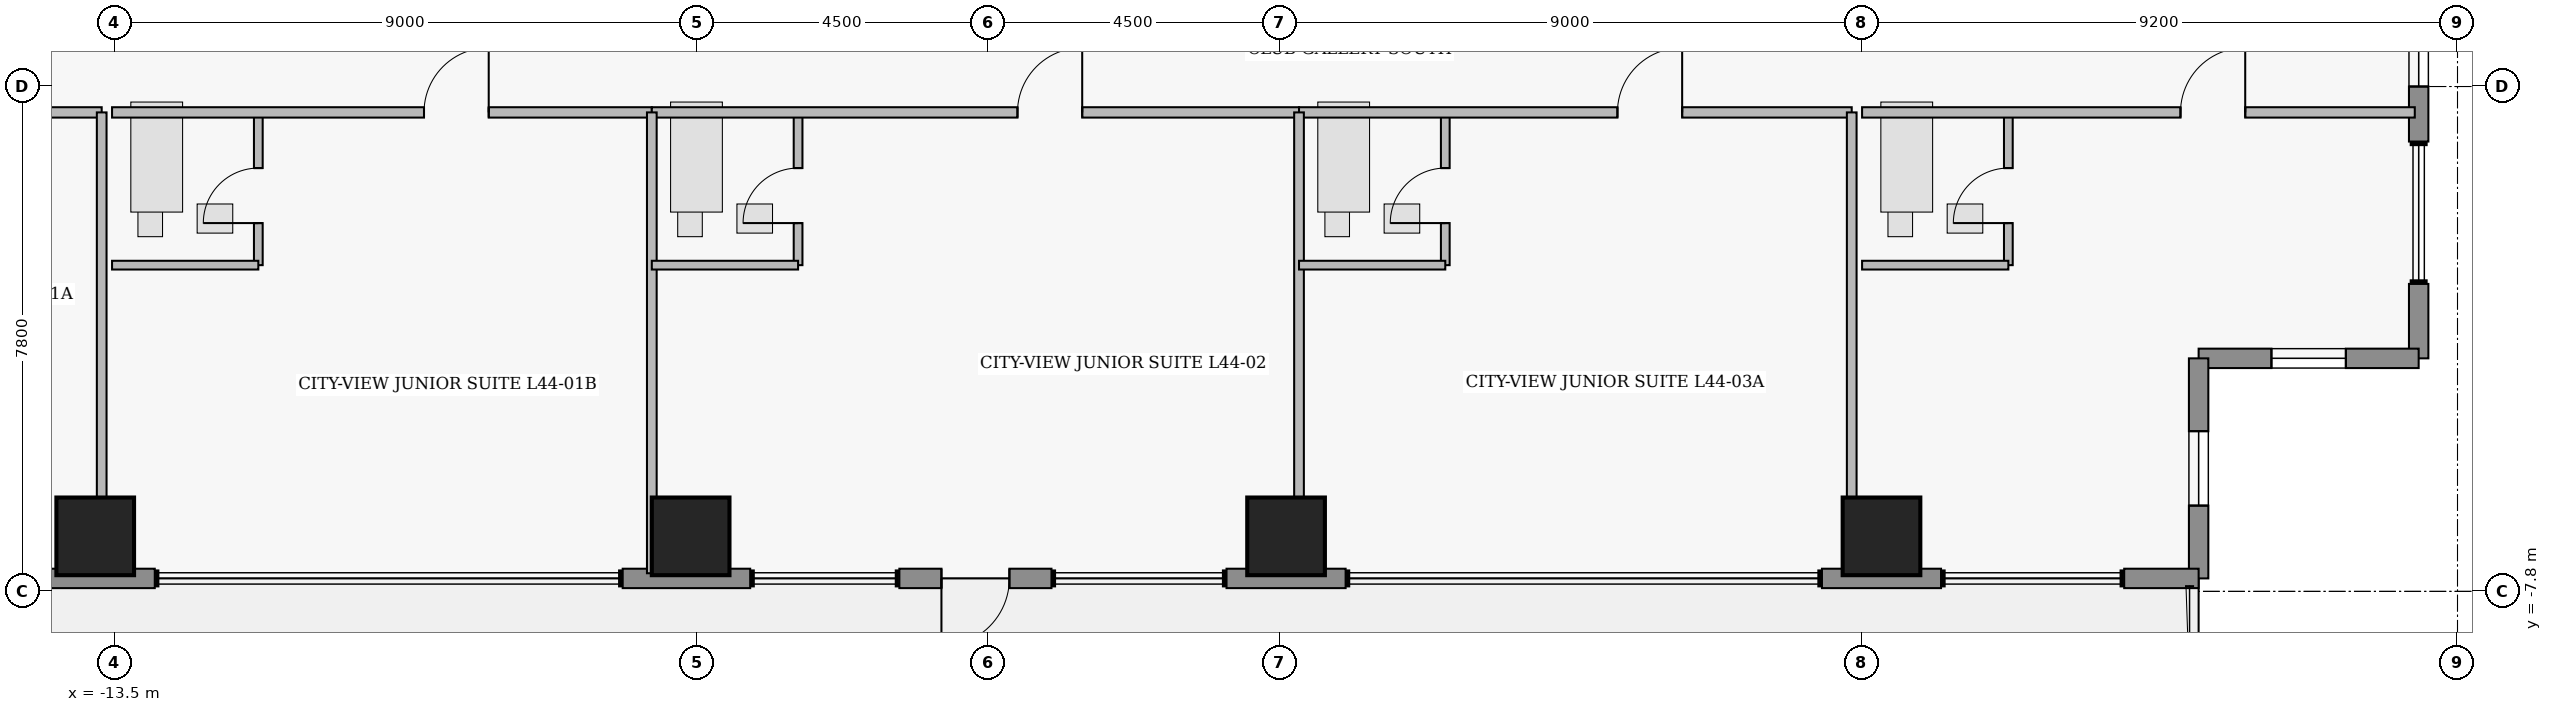
"""IFC4 building model, lengths in metres.
Left out: names, types, materials, properties, quantities, classifications, styles, units other than length and angle.
Written with IfcOpenShell. Run it as: python <this file> out.ifc"""

import sys

from ifc_helpers import new_model, si_unit, direction, frame, frame_2d, origin, origin_2d, place, context, subcontext, project, spatial, rectangle, extrude, element, fill, save


model = new_model("IFC4")
c1 = context("Model", 3, precision=1e-05, world=origin(), true_north=direction((0.0, 1.0)))
c2 = subcontext(c1, "Body", "Model", "MODEL_VIEW")
j1 = project(units=[si_unit("LENGTHUNIT", "METRE"), si_unit("PLANEANGLEUNIT", "RADIAN")], contexts=[c1])
p1 = place(None, origin())
s1 = spatial("IfcSite", under=j1, at=p1, CompositionType="ELEMENT")
p2 = place(p1, origin())
s2 = spatial("IfcBuilding", under=s1, at=p2, CompositionType="ELEMENT")
p3 = place(p2, frame((0.0, 0.0, 177.4)))
s3 = spatial("IfcBuildingStorey", under=s2, at=p3, CompositionType="ELEMENT", Elevation=177.4)
for number, where, z_axis, x_axis in (
    (1, (-13.8, -6.95, 0.0), (0.0, 0.0, 1.0), (1.0, 0.0, 0.0)),
    (2, (-4.6, -6.95, 0.0), (0.0, 0.0, 1.0), (1.0, 0.0, 0.0)),
    (3, (4.6, -6.95, 0.0), (0.0, 0.0, 1.0), (1.0, 0.0, 0.0)),
    (4, (13.8, -6.95, 0.0), (0.0, 0.0, 1.0), (1.0, 0.0, 0.0)),
):
    element("IfcColumn", number, at=place(p3, frame(where, z_axis=z_axis, x_axis=x_axis)), inside=s3, PredefinedType="COLUMN", context=c2, shape_type="SweptSolid", body=[
        extrude(rectangle(XDim=1.2, YDim=1.2, at=origin_2d()), origin(), (0.0, 0.0, 1.0), 3.75),
    ])
p4 = place(p3, frame((22.1, 2.0, 0.0), z_axis=(0.0, 0.0, 1.0), x_axis=(0.0, -1.0, 0.0)))
e5 = element("IfcWall", 5, at=p4, inside=s3, PredefinedType="STANDARD", context=c2, shape_type="SweptSolid", body=[
    extrude(rectangle(XDim=2.85, YDim=0.3, at=frame_2d((1.425, 0.0))), origin(), (0.0, 0.0, 1.0), 3.53),
])
p5 = place(p4, frame((0.85, 0.0, 0.95)))
e6 = element("IfcOpeningElement", 6, at=p5, cuts=e5, PredefinedType="OPENING", context=c2, shape_type="SweptSolid", body=[
    extrude(rectangle(XDim=1.15, YDim=1.55, at=frame_2d((0.575, 0.775))), frame((0.0, 0.16, 0.0), z_axis=(0.0, -1.0, 0.0), x_axis=(1.0, 0.0, 0.0)), (0.0, 0.0, 1.0), 0.32),
])
p6 = place(p3, frame((22.1, -3.05, 0.0), z_axis=(0.0, 0.0, 1.0), x_axis=(0.0, -1.0, 0.0)))
e7 = element("IfcWall", 7, at=p6, inside=s3, PredefinedType="STANDARD", context=c2, shape_type="SweptSolid", body=[
    extrude(rectangle(XDim=1.15, YDim=0.3, at=frame_2d((0.575, 0.0))), origin(), (0.0, 0.0, 1.0), 3.53),
])
p7 = place(p3, frame((22.1, -4.2, 0.0), z_axis=(0.0, 0.0, 1.0), x_axis=(-1.0, 0.0, 0.0)))
e8 = element("IfcWall", 8, at=p7, inside=s3, PredefinedType="STANDARD", context=c2, shape_type="SweptSolid", body=[
    extrude(rectangle(XDim=3.4, YDim=0.3, at=frame_2d((1.7, 0.0))), origin(), (0.0, 0.0, 1.0), 3.53),
])
p8 = place(p7, frame((1.125, 0.0, 1.25)))
e9 = element("IfcOpeningElement", 9, at=p8, cuts=e8, PredefinedType="OPENING", context=c2, shape_type="SweptSolid", body=[
    extrude(rectangle(XDim=1.15, YDim=1.55, at=frame_2d((0.575, 0.775))), frame((0.0, 0.16, 0.0), z_axis=(0.0, -1.0, 0.0), x_axis=(1.0, 0.0, 0.0)), (0.0, 0.0, 1.0), 0.32),
])
p9 = place(p3, frame((18.7, -4.2, 0.0), z_axis=(0.0, 0.0, 1.0), x_axis=(0.0, -1.0, 0.0)))
e10 = element("IfcWall", 10, at=p9, inside=s3, PredefinedType="STANDARD", context=c2, shape_type="SweptSolid", body=[
    extrude(rectangle(XDim=3.4, YDim=0.3, at=frame_2d((1.7, 0.0))), origin(), (0.0, 0.0, 1.0), 3.53),
])
p10 = place(p9, frame((1.125, 0.0, 1.25)))
e11 = element("IfcOpeningElement", 11, at=p10, cuts=e10, PredefinedType="OPENING", context=c2, shape_type="SweptSolid", body=[
    extrude(rectangle(XDim=1.15, YDim=1.55, at=frame_2d((0.575, 0.775))), frame((0.0, 0.16, 0.0), z_axis=(0.0, -1.0, 0.0), x_axis=(1.0, 0.0, 0.0)), (0.0, 0.0, 1.0), 0.32),
])
p11 = place(p3, frame((18.7, -7.6, 0.0), z_axis=(0.0, 0.0, 1.0), x_axis=(-1.0, 0.0, 0.0)))
e12 = element("IfcWall", 12, at=p11, inside=s3, PredefinedType="STANDARD", context=c2, shape_type="SweptSolid", body=[
    extrude(rectangle(XDim=1.15, YDim=0.3, at=frame_2d((0.575, 0.0))), origin(), (0.0, 0.0, 1.0), 3.53),
])
for number, where, z_axis, x_axis in (
    (13, (14.72, -7.6, 0.0), (0.0, 0.0, 1.0), (-1.0, 0.0, 0.0)),
    (14, (5.52, -7.6, 0.0), (0.0, 0.0, 1.0), (-1.0, 0.0, 0.0)),
):
    element("IfcWall", number, at=place(p3, frame(where, z_axis=z_axis, x_axis=x_axis)), inside=s3, PredefinedType="STANDARD", context=c2, shape_type="SweptSolid", body=[
        extrude(rectangle(XDim=1.84, YDim=0.3, at=frame_2d((0.92, 0.0))), origin(), (0.0, 0.0, 1.0), 3.53),
    ])
p12 = place(p3, frame((0.975, -7.6, 0.0), z_axis=(0.0, 0.0, 1.0), x_axis=(-1.0, 0.0, 0.0)))
e15 = element("IfcWall", 15, at=p12, inside=s3, PredefinedType="STANDARD", context=c2, shape_type="SweptSolid", body=[
    extrude(rectangle(XDim=2.35, YDim=0.3, at=frame_2d((1.175, 0.0))), origin(), (0.0, 0.0, 1.0), 3.53),
])
p13 = place(p12, frame((0.65, 0.0, 0.0)))
e16 = element("IfcOpeningElement", 16, at=p13, cuts=e15, PredefinedType="OPENING", context=c2, shape_type="SweptSolid", body=[
    extrude(rectangle(XDim=1.05, YDim=2.2, at=frame_2d((0.525, 1.1))), frame((0.0, 0.16, 0.0), z_axis=(0.0, -1.0, 0.0), x_axis=(1.0, 0.0, 0.0)), (0.0, 0.0, 1.0), 0.32),
])
p14 = place(p3, frame((-3.68, -7.6, 0.0), z_axis=(0.0, 0.0, 1.0), x_axis=(-1.0, 0.0, 0.0)))
e17 = element("IfcWall", 17, at=p14, inside=s3, PredefinedType="STANDARD", context=c2, shape_type="SweptSolid", body=[
    extrude(rectangle(XDim=1.97, YDim=0.3, at=frame_2d((0.985, 0.0))), origin(), (0.0, 0.0, 1.0), 3.53),
])
p15 = place(p3, frame((-12.88, -7.6, 0.0), z_axis=(0.0, 0.0, 1.0), x_axis=(-1.0, 0.0, 0.0)))
e18 = element("IfcWall", 18, at=p15, inside=s3, PredefinedType="STANDARD", context=c2, shape_type="SweptSolid", body=[
    extrude(rectangle(XDim=1.84, YDim=0.3, at=frame_2d((0.92, 0.0))), origin(), (0.0, 0.0, 1.0), 3.53),
])
p16 = place(p3, frame((-22.04, -0.4, 0.0), z_axis=(0.0, 0.0, 1.0), x_axis=(1.0, 0.0, 0.0)))
e19 = element("IfcWall", 19, at=p16, inside=s3, PredefinedType="PARTITIONING", context=c2, shape_type="SweptSolid", body=[
    extrude(rectangle(XDim=8.34, YDim=0.16, at=frame_2d((4.17, 0.0))), origin(), (0.0, 0.0, 1.0), 3.53),
])
p17 = place(p16, frame((4.82, 0.0, 0.0)))
e20 = element("IfcOpeningElement", 20, at=p17, cuts=e19, PredefinedType="OPENING", context=c2, shape_type="SweptSolid", body=[
    extrude(rectangle(XDim=1.0, YDim=2.15, at=frame_2d((0.5, 1.075))), frame((0.0, 0.09, 0.0), z_axis=(0.0, -1.0, 0.0), x_axis=(1.0, 0.0, 0.0)), (0.0, 0.0, 1.0), 0.18),
])
p18 = place(p3, frame((-11.28, -2.76, 0.0), z_axis=(0.0, 0.0, 1.0), x_axis=(0.0, 1.0, 0.0)))
e21 = element("IfcWall", 21, at=p18, inside=s3, PredefinedType="PLUMBINGWALL", context=c2, shape_type="SweptSolid", body=[
    extrude(rectangle(XDim=2.36, YDim=0.135, at=frame_2d((1.18, 0.0))), origin(), (0.0, 0.0, 1.0), 3.53),
])
p19 = place(p18, frame((0.65, 0.0, 0.0)))
e22 = element("IfcOpeningElement", 22, at=p19, cuts=e21, PredefinedType="OPENING", context=c2, shape_type="SweptSolid", body=[
    extrude(rectangle(XDim=0.85, YDim=2.1, at=frame_2d((0.425, 1.05))), frame((0.0, 0.077, 0.0), z_axis=(0.0, -1.0, 0.0), x_axis=(1.0, 0.0, 0.0)), (0.0, 0.0, 1.0), 0.155),
])
p20 = place(p3, frame((-13.54, -0.4, 0.0), z_axis=(0.0, 0.0, 1.0), x_axis=(1.0, 0.0, 0.0)))
e23 = element("IfcWall", 23, at=p20, inside=s3, PredefinedType="PARTITIONING", context=c2, shape_type="SweptSolid", body=[
    extrude(rectangle(XDim=8.34, YDim=0.16, at=frame_2d((4.17, 0.0))), origin(), (0.0, 0.0, 1.0), 3.53),
])
p21 = place(p20, frame((4.82, 0.0, 0.0)))
e24 = element("IfcOpeningElement", 24, at=p21, cuts=e23, PredefinedType="OPENING", context=c2, shape_type="SweptSolid", body=[
    extrude(rectangle(XDim=1.0, YDim=2.15, at=frame_2d((0.5, 1.075))), frame((0.0, 0.09, 0.0), z_axis=(0.0, -1.0, 0.0), x_axis=(1.0, 0.0, 0.0)), (0.0, 0.0, 1.0), 0.18),
])
p22 = place(p3, frame((-2.94, -2.76, 0.0), z_axis=(0.0, 0.0, 1.0), x_axis=(0.0, 1.0, 0.0)))
e25 = element("IfcWall", 25, at=p22, inside=s3, PredefinedType="PLUMBINGWALL", context=c2, shape_type="SweptSolid", body=[
    extrude(rectangle(XDim=2.36, YDim=0.135, at=frame_2d((1.18, 0.0))), origin(), (0.0, 0.0, 1.0), 3.53),
])
p23 = place(p22, frame((0.65, 0.0, 0.0)))
e26 = element("IfcOpeningElement", 26, at=p23, cuts=e25, PredefinedType="OPENING", context=c2, shape_type="SweptSolid", body=[
    extrude(rectangle(XDim=0.85, YDim=2.1, at=frame_2d((0.425, 1.05))), frame((0.0, 0.077, 0.0), z_axis=(0.0, -1.0, 0.0), x_axis=(1.0, 0.0, 0.0)), (0.0, 0.0, 1.0), 0.155),
])
p24 = place(p3, frame((-5.2, -0.4, 0.0), z_axis=(0.0, 0.0, 1.0), x_axis=(1.0, 0.0, 0.0)))
e27 = element("IfcWall", 27, at=p24, inside=s3, PredefinedType="PARTITIONING", context=c2, shape_type="SweptSolid", body=[
    extrude(rectangle(XDim=10.0, YDim=0.16, at=frame_2d((5.0, 0.0))), origin(), (0.0, 0.0, 1.0), 3.53),
])
p25 = place(p24, frame((5.65, 0.0, 0.0)))
e28 = element("IfcOpeningElement", 28, at=p25, cuts=e27, PredefinedType="OPENING", context=c2, shape_type="SweptSolid", body=[
    extrude(rectangle(XDim=1.0, YDim=2.15, at=frame_2d((0.5, 1.075))), frame((0.0, 0.09, 0.0), z_axis=(0.0, -1.0, 0.0), x_axis=(1.0, 0.0, 0.0)), (0.0, 0.0, 1.0), 0.18),
])
p26 = place(p3, frame((7.06, -2.76, 0.0), z_axis=(0.0, 0.0, 1.0), x_axis=(0.0, 1.0, 0.0)))
e29 = element("IfcWall", 29, at=p26, inside=s3, PredefinedType="PLUMBINGWALL", context=c2, shape_type="SweptSolid", body=[
    extrude(rectangle(XDim=2.36, YDim=0.135, at=frame_2d((1.18, 0.0))), origin(), (0.0, 0.0, 1.0), 3.53),
])
p27 = place(p26, frame((0.65, 0.0, 0.0)))
e30 = element("IfcOpeningElement", 30, at=p27, cuts=e29, PredefinedType="OPENING", context=c2, shape_type="SweptSolid", body=[
    extrude(rectangle(XDim=0.85, YDim=2.1, at=frame_2d((0.425, 1.05))), frame((0.0, 0.077, 0.0), z_axis=(0.0, -1.0, 0.0), x_axis=(1.0, 0.0, 0.0)), (0.0, 0.0, 1.0), 0.155),
])
p28 = place(p3, frame((4.8, -0.4, 0.0), z_axis=(0.0, 0.0, 1.0), x_axis=(1.0, 0.0, 0.0)))
e31 = element("IfcWall", 31, at=p28, inside=s3, PredefinedType="PARTITIONING", context=c2, shape_type="SweptSolid", body=[
    extrude(rectangle(XDim=8.54, YDim=0.16, at=frame_2d((4.27, 0.0))), origin(), (0.0, 0.0, 1.0), 3.53),
])
p29 = place(p28, frame((4.92, 0.0, 0.0)))
e32 = element("IfcOpeningElement", 32, at=p29, cuts=e31, PredefinedType="OPENING", context=c2, shape_type="SweptSolid", body=[
    extrude(rectangle(XDim=1.0, YDim=2.15, at=frame_2d((0.5, 1.075))), frame((0.0, 0.09, 0.0), z_axis=(0.0, -1.0, 0.0), x_axis=(1.0, 0.0, 0.0)), (0.0, 0.0, 1.0), 0.18),
])
p30 = place(p3, frame((15.76, -2.76, 0.0), z_axis=(0.0, 0.0, 1.0), x_axis=(0.0, 1.0, 0.0)))
e33 = element("IfcWall", 33, at=p30, inside=s3, PredefinedType="PLUMBINGWALL", context=c2, shape_type="SweptSolid", body=[
    extrude(rectangle(XDim=2.36, YDim=0.135, at=frame_2d((1.18, 0.0))), origin(), (0.0, 0.0, 1.0), 3.53),
])
p31 = place(p30, frame((0.65, 0.0, 0.0)))
e34 = element("IfcOpeningElement", 34, at=p31, cuts=e33, PredefinedType="OPENING", context=c2, shape_type="SweptSolid", body=[
    extrude(rectangle(XDim=0.85, YDim=2.1, at=frame_2d((0.425, 1.05))), frame((0.0, 0.077, 0.0), z_axis=(0.0, -1.0, 0.0), x_axis=(1.0, 0.0, 0.0)), (0.0, 0.0, 1.0), 0.155),
])
p32 = place(p3, frame((13.5, -0.4, 0.0), z_axis=(0.0, 0.0, 1.0), x_axis=(1.0, 0.0, 0.0)))
e35 = element("IfcWall", 35, at=p32, inside=s3, PredefinedType="PARTITIONING", context=c2, shape_type="SweptSolid", body=[
    extrude(rectangle(XDim=8.54, YDim=0.16, at=frame_2d((4.27, 0.0))), origin(), (0.0, 0.0, 1.0), 3.53),
])
p33 = place(p32, frame((4.92, 0.0, 0.0)))
e36 = element("IfcOpeningElement", 36, at=p33, cuts=e35, PredefinedType="OPENING", context=c2, shape_type="SweptSolid", body=[
    extrude(rectangle(XDim=1.0, YDim=2.15, at=frame_2d((0.5, 1.075))), frame((0.0, 0.09, 0.0), z_axis=(0.0, -1.0, 0.0), x_axis=(1.0, 0.0, 0.0)), (0.0, 0.0, 1.0), 0.18),
])
p34 = place(p3, frame((-13.7, -7.52, 0.0), z_axis=(0.0, 0.0, 1.0), x_axis=(0.0, 1.0, 0.0)))
e37 = element("IfcWall", 37, at=p34, inside=s3, PredefinedType="PARTITIONING", context=c2, shape_type="SweptSolid", body=[
    extrude(rectangle(XDim=7.12, YDim=0.15, at=frame_2d((3.56, 0.0))), origin(), (0.0, 0.0, 1.0), 2.923),
])
p35 = place(p3, frame((-13.54, -2.76, 0.0), z_axis=(0.0, 0.0, 1.0), x_axis=(1.0, 0.0, 0.0)))
e38 = element("IfcWall", 38, at=p35, inside=s3, PredefinedType="PLUMBINGWALL", context=c2, shape_type="SweptSolid", body=[
    extrude(rectangle(XDim=2.26, YDim=0.135, at=frame_2d((1.13, 0.0))), origin(), (0.0, 0.0, 1.0), 3.124),
])
p36 = place(p3, frame((-5.2, -7.52, 0.0), z_axis=(0.0, 0.0, 1.0), x_axis=(0.0, 1.0, 0.0)))
e39 = element("IfcWall", 39, at=p36, inside=s3, PredefinedType="PARTITIONING", context=c2, shape_type="SweptSolid", body=[
    extrude(rectangle(XDim=7.12, YDim=0.15, at=frame_2d((3.56, 0.0))), origin(), (0.0, 0.0, 1.0), 3.53),
])
p37 = place(p3, frame((-5.2, -2.76, 0.0), z_axis=(0.0, 0.0, 1.0), x_axis=(1.0, 0.0, 0.0)))
e40 = element("IfcWall", 40, at=p37, inside=s3, PredefinedType="PLUMBINGWALL", context=c2, shape_type="SweptSolid", body=[
    extrude(rectangle(XDim=2.26, YDim=0.135, at=frame_2d((1.13, 0.0))), origin(), (0.0, 0.0, 1.0), 3.124),
])
p38 = place(p3, frame((4.8, -7.52, 0.0), z_axis=(0.0, 0.0, 1.0), x_axis=(0.0, 1.0, 0.0)))
e41 = element("IfcWall", 41, at=p38, inside=s3, PredefinedType="PARTITIONING", context=c2, shape_type="SweptSolid", body=[
    extrude(rectangle(XDim=7.12, YDim=0.15, at=frame_2d((3.56, 0.0))), origin(), (0.0, 0.0, 1.0), 2.923),
])
p39 = place(p3, frame((4.8, -2.76, 0.0), z_axis=(0.0, 0.0, 1.0), x_axis=(1.0, 0.0, 0.0)))
e42 = element("IfcWall", 42, at=p39, inside=s3, PredefinedType="PLUMBINGWALL", context=c2, shape_type="SweptSolid", body=[
    extrude(rectangle(XDim=2.26, YDim=0.135, at=frame_2d((1.13, 0.0))), origin(), (0.0, 0.0, 1.0), 3.124),
])
p40 = place(p3, frame((13.34, -7.52, 0.0), z_axis=(0.0, 0.0, 1.0), x_axis=(0.0, 1.0, 0.0)))
e43 = element("IfcWall", 43, at=p40, inside=s3, PredefinedType="PARTITIONING", context=c2, shape_type="SweptSolid", body=[
    extrude(rectangle(XDim=7.12, YDim=0.15, at=frame_2d((3.56, 0.0))), origin(), (0.0, 0.0, 1.0), 2.923),
])
p41 = place(p3, frame((13.5, -2.76, 0.0), z_axis=(0.0, 0.0, 1.0), x_axis=(1.0, 0.0, 0.0)))
e44 = element("IfcWall", 44, at=p41, inside=s3, PredefinedType="PLUMBINGWALL", context=c2, shape_type="SweptSolid", body=[
    extrude(rectangle(XDim=2.26, YDim=0.135, at=frame_2d((1.13, 0.0))), origin(), (0.0, 0.0, 1.0), 3.53),
])
p42 = place(p5, origin())
e45 = element("IfcWindow", 45, at=p42, inside=s3, PartitioningType="SINGLE_PANEL", PredefinedType="WINDOW", context=c2, shape_type="SweptSolid", body=[
    extrude(rectangle(XDim=1.15, YDim=1.55, at=frame_2d((0.575, 0.775))), frame((0.0, 0.03, 0.0), z_axis=(0.0, -1.0, 0.0), x_axis=(1.0, 0.0, 0.0)), (0.0, 0.0, 1.0), 0.06),
])
fill(e6, e45)
p43 = place(p8, origin())
e46 = element("IfcWindow", 46, at=p43, inside=s3, PartitioningType="SINGLE_PANEL", PredefinedType="WINDOW", context=c2, shape_type="SweptSolid", body=[
    extrude(rectangle(XDim=1.15, YDim=1.55, at=frame_2d((0.575, 0.775))), frame((0.0, 0.03, 0.0), z_axis=(0.0, -1.0, 0.0), x_axis=(1.0, 0.0, 0.0)), (0.0, 0.0, 1.0), 0.06),
])
fill(e9, e46)
p44 = place(p10, origin())
e47 = element("IfcWindow", 47, at=p44, inside=s3, PartitioningType="SINGLE_PANEL", PredefinedType="WINDOW", context=c2, shape_type="SweptSolid", body=[
    extrude(rectangle(XDim=1.15, YDim=1.55, at=frame_2d((0.575, 0.775))), frame((0.0, 0.03, 0.0), z_axis=(0.0, -1.0, 0.0), x_axis=(1.0, 0.0, 0.0)), (0.0, 0.0, 1.0), 0.06),
])
fill(e11, e47)
p45 = place(p13, origin())
e48 = element("IfcDoor", 48, at=p45, inside=s3, OperationType="SINGLE_SWING_RIGHT", PredefinedType="DOOR", context=c2, shape_type="SweptSolid", body=[
    extrude(rectangle(XDim=1.05, YDim=2.2, at=frame_2d((0.525, 1.1))), frame((0.0, 0.025, 0.0), z_axis=(0.0, -1.0, 0.0), x_axis=(1.0, 0.0, 0.0)), (0.0, 0.0, 1.0), 0.05),
])
fill(e16, e48)
p46 = place(p19, origin())
e49 = element("IfcDoor", 49, at=p46, inside=s3, OperationType="SINGLE_SWING_LEFT", PredefinedType="DOOR", context=c2, shape_type="SweptSolid", body=[
    extrude(rectangle(XDim=0.85, YDim=2.1, at=frame_2d((0.425, 1.05))), frame((0.0, 0.025, 0.0), z_axis=(0.0, -1.0, 0.0), x_axis=(1.0, 0.0, 0.0)), (0.0, 0.0, 1.0), 0.05),
])
fill(e22, e49)
p47 = place(p21, origin())
e50 = element("IfcDoor", 50, at=p47, inside=s3, OperationType="SINGLE_SWING_RIGHT", PredefinedType="DOOR", context=c2, shape_type="SweptSolid", body=[
    extrude(rectangle(XDim=1.0, YDim=2.15, at=frame_2d((0.5, 1.075))), frame((0.0, 0.025, 0.0), z_axis=(0.0, -1.0, 0.0), x_axis=(1.0, 0.0, 0.0)), (0.0, 0.0, 1.0), 0.05),
])
fill(e24, e50)
p48 = place(p23, origin())
e51 = element("IfcDoor", 51, at=p48, inside=s3, OperationType="SINGLE_SWING_LEFT", PredefinedType="DOOR", context=c2, shape_type="SweptSolid", body=[
    extrude(rectangle(XDim=0.85, YDim=2.1, at=frame_2d((0.425, 1.05))), frame((0.0, 0.025, 0.0), z_axis=(0.0, -1.0, 0.0), x_axis=(1.0, 0.0, 0.0)), (0.0, 0.0, 1.0), 0.05),
])
fill(e26, e51)
p49 = place(p25, origin())
e52 = element("IfcDoor", 52, at=p49, inside=s3, OperationType="SINGLE_SWING_RIGHT", PredefinedType="DOOR", context=c2, shape_type="SweptSolid", body=[
    extrude(rectangle(XDim=1.0, YDim=2.15, at=frame_2d((0.5, 1.075))), frame((0.0, 0.025, 0.0), z_axis=(0.0, -1.0, 0.0), x_axis=(1.0, 0.0, 0.0)), (0.0, 0.0, 1.0), 0.05),
])
fill(e28, e52)
p50 = place(p27, origin())
e53 = element("IfcDoor", 53, at=p50, inside=s3, OperationType="SINGLE_SWING_LEFT", PredefinedType="DOOR", context=c2, shape_type="SweptSolid", body=[
    extrude(rectangle(XDim=0.85, YDim=2.1, at=frame_2d((0.425, 1.05))), frame((0.0, 0.025, 0.0), z_axis=(0.0, -1.0, 0.0), x_axis=(1.0, 0.0, 0.0)), (0.0, 0.0, 1.0), 0.05),
])
fill(e30, e53)
p51 = place(p29, origin())
e54 = element("IfcDoor", 54, at=p51, inside=s3, OperationType="SINGLE_SWING_RIGHT", PredefinedType="DOOR", context=c2, shape_type="SweptSolid", body=[
    extrude(rectangle(XDim=1.0, YDim=2.15, at=frame_2d((0.5, 1.075))), frame((0.0, 0.025, 0.0), z_axis=(0.0, -1.0, 0.0), x_axis=(1.0, 0.0, 0.0)), (0.0, 0.0, 1.0), 0.05),
])
fill(e32, e54)
p52 = place(p31, origin())
e55 = element("IfcDoor", 55, at=p52, inside=s3, OperationType="SINGLE_SWING_LEFT", PredefinedType="DOOR", context=c2, shape_type="SweptSolid", body=[
    extrude(rectangle(XDim=0.85, YDim=2.1, at=frame_2d((0.425, 1.05))), frame((0.0, 0.025, 0.0), z_axis=(0.0, -1.0, 0.0), x_axis=(1.0, 0.0, 0.0)), (0.0, 0.0, 1.0), 0.05),
])
fill(e34, e55)
p53 = place(p33, origin())
e56 = element("IfcDoor", 56, at=p53, inside=s3, OperationType="SINGLE_SWING_RIGHT", PredefinedType="DOOR", context=c2, shape_type="SweptSolid", body=[
    extrude(rectangle(XDim=1.0, YDim=2.15, at=frame_2d((0.5, 1.075))), frame((0.0, 0.025, 0.0), z_axis=(0.0, -1.0, 0.0), x_axis=(1.0, 0.0, 0.0)), (0.0, 0.0, 1.0), 0.05),
])
fill(e36, e56)
save(model, sys.argv[1])
